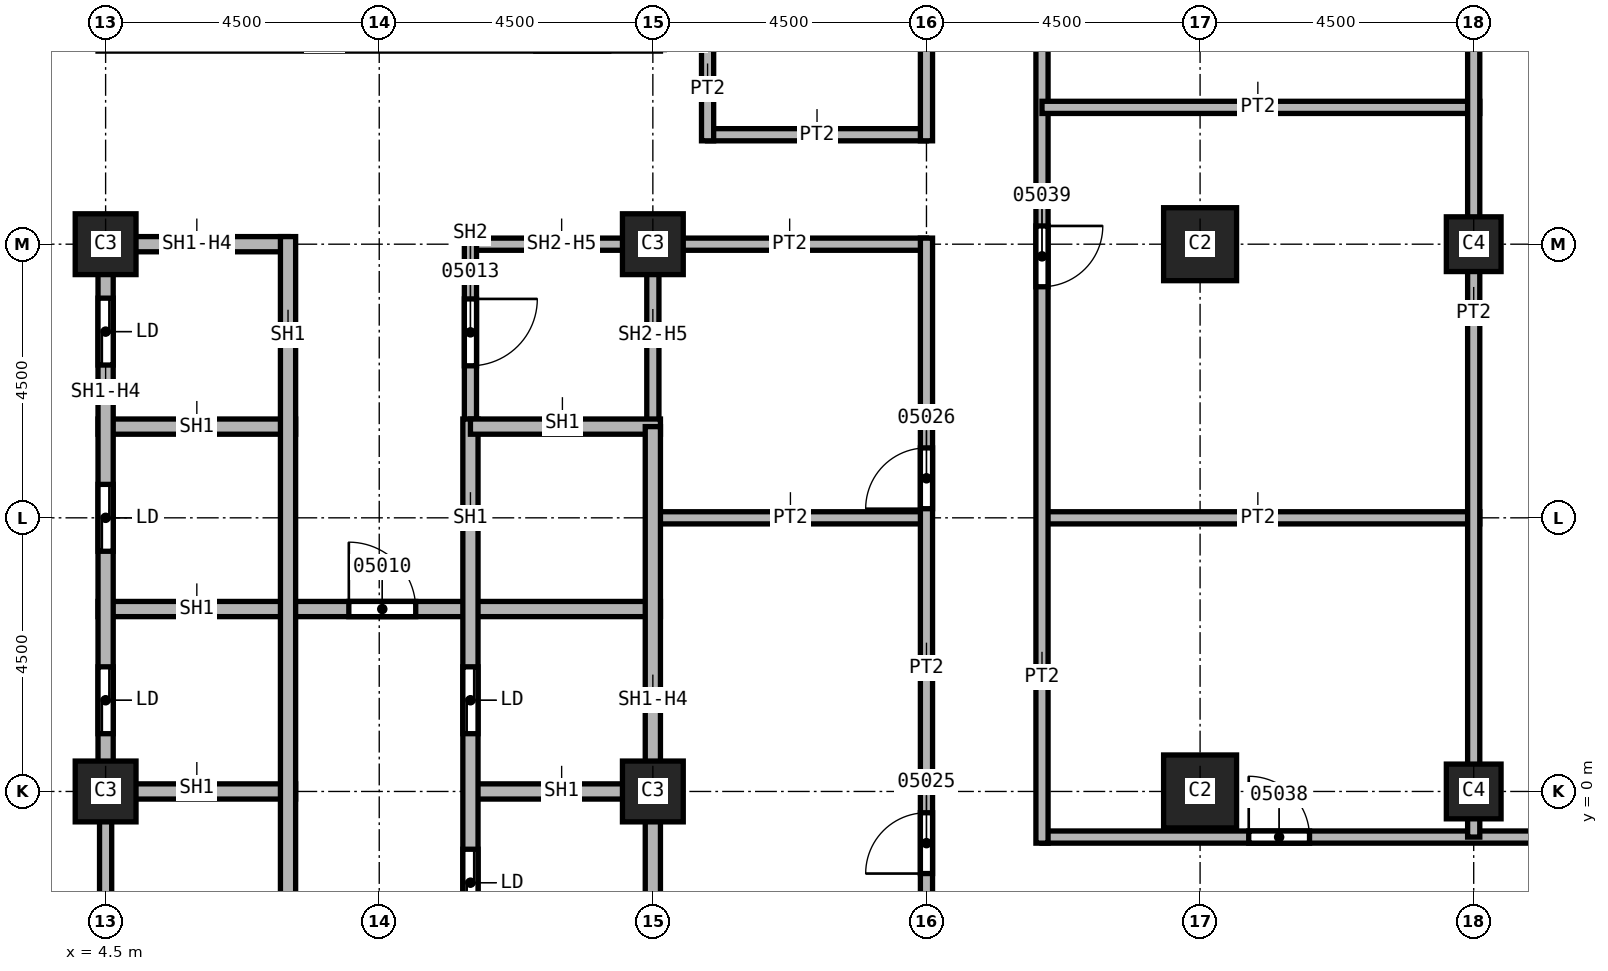
"""IFC4 building model, lengths in metres.
Left out: names, types, materials, properties, quantities, classifications, styles, units other than length and angle.
Written with IfcOpenShell. Run it as: python <this file> out.ifc"""

import sys

from ifc_helpers import new_model, si_unit, direction, frame, frame_2d, origin, origin_2d, place, context, subcontext, project, spatial, rectangle, extrude, element, fill, save


model = new_model("IFC4")
c1 = context("Model", 3, precision=1e-05, world=origin(), true_north=direction((0.0, 1.0)))
c2 = subcontext(c1, "Body", "Model", "MODEL_VIEW")
j1 = project(units=[si_unit("LENGTHUNIT", "METRE"), si_unit("PLANEANGLEUNIT", "RADIAN")], contexts=[c1])
p1 = place(None, origin())
s1 = spatial("IfcSite", under=j1, at=p1, CompositionType="ELEMENT")
p2 = place(p1, origin())
s2 = spatial("IfcBuilding", under=s1, at=p2, CompositionType="ELEMENT")
p3 = place(p2, frame((0.0, 0.0, 116.0)))
s3 = spatial("IfcBuildingStorey", under=s2, at=p3, CompositionType="ELEMENT", Elevation=116.0)
for number, where, z_axis, x_axis in (
    (1, (22.5, 0.0, 0.0), (0.0, 0.0, 1.0), (1.0, 0.0, 0.0)),
    (2, (22.5, 9.0, 0.0), (0.0, 0.0, 1.0), (1.0, 0.0, 0.0)),
):
    element("IfcColumn", number, at=place(p3, frame(where, z_axis=z_axis, x_axis=x_axis)), inside=s3, PredefinedType="COLUMN", context=c2, shape_type="SweptSolid", body=[
        extrude(rectangle(XDim=1.2, YDim=1.2, at=origin_2d()), origin(), (0.0, 0.0, 1.0), 3.6),
    ])
for number, where, z_axis, x_axis in (
    (3, (4.5, 0.0, 0.0), (0.0, 0.0, 1.0), (1.0, 0.0, 0.0)),
    (4, (4.5, 9.0, 0.0), (0.0, 0.0, 1.0), (1.0, 0.0, 0.0)),
    (5, (13.5, 0.0, 0.0), (0.0, 0.0, 1.0), (1.0, 0.0, 0.0)),
    (6, (13.5, 9.0, 0.0), (0.0, 0.0, 1.0), (1.0, 0.0, 0.0)),
):
    element("IfcColumn", number, at=place(p3, frame(where, z_axis=z_axis, x_axis=x_axis)), inside=s3, PredefinedType="COLUMN", context=c2, shape_type="SweptSolid", body=[
        extrude(rectangle(XDim=1.0, YDim=1.0, at=origin_2d()), origin(), (0.0, 0.0, 1.0), 3.6),
    ])
for number, where, z_axis, x_axis in (
    (7, (27.0, 0.0, 0.0), (0.0, 0.0, 1.0), (1.0, 0.0, 0.0)),
    (8, (27.0, 9.0, 0.0), (0.0, 0.0, 1.0), (1.0, 0.0, 0.0)),
):
    element("IfcColumn", number, at=place(p3, frame(where, z_axis=z_axis, x_axis=x_axis)), inside=s3, PredefinedType="COLUMN", context=c2, shape_type="SweptSolid", body=[
        extrude(rectangle(XDim=0.9, YDim=0.9, at=origin_2d()), origin(), (0.0, 0.0, 1.0), 3.6),
    ])
for number, where, z_axis, x_axis in (
    (9, (13.5, 4.5, 0.0), (0.0, 0.0, 1.0), (1.0, 0.0, 0.0)),
    (10, (18.0, 9.0, 0.0), (0.0, 0.0, 1.0), (-1.0, 0.0, 0.0)),
):
    element("IfcWall", number, at=place(p3, frame(where, z_axis=z_axis, x_axis=x_axis)), inside=s3, PredefinedType="PARTITIONING", context=c2, shape_type="SweptSolid", body=[
        extrude(rectangle(XDim=4.5, YDim=0.2, at=frame_2d((2.25, 0.0))), origin(), (0.0, 0.0, 1.0), 3.6),
    ])
p4 = place(p3, frame((14.4, 10.8, 0.0), z_axis=(0.0, 0.0, 1.0), x_axis=(1.0, 0.0, 0.0)))
e11 = element("IfcWall", 11, at=p4, inside=s3, PredefinedType="PARTITIONING", context=c2, shape_type="SweptSolid", body=[
    extrude(rectangle(XDim=3.6, YDim=0.2, at=frame_2d((1.8, 0.0))), origin(), (0.0, 0.0, 1.0), 3.6),
])
p5 = place(p3, frame((14.4, 12.3, 0.0), z_axis=(0.0, 0.0, 1.0), x_axis=(0.0, -1.0, 0.0)))
e12 = element("IfcWall", 12, at=p5, inside=s3, PredefinedType="PARTITIONING", context=c2, shape_type="SweptSolid", body=[
    extrude(rectangle(XDim=1.6, YDim=0.2, at=frame_2d((0.8, 0.0))), origin(), (0.0, 0.0, 1.0), 3.6),
])
p6 = place(p3, frame((18.0, -9.1, 0.0), z_axis=(0.0, 0.0, 1.0), x_axis=(0.0, 1.0, 0.0)))
e13 = element("IfcWall", 13, at=p6, inside=s3, PredefinedType="PARTITIONING", context=c2, shape_type="SweptSolid", body=[
    extrude(rectangle(XDim=18.2, YDim=0.2, at=frame_2d((9.1, 0.0))), origin(), (0.0, 0.0, 1.0), 3.6),
])
p7 = place(p6, frame((1.9, 0.0, 0.0)))
e14 = element("IfcOpeningElement", 14, at=p7, cuts=e13, PredefinedType="OPENING", context=c2, shape_type="SweptSolid", body=[
    extrude(rectangle(XDim=1.0, YDim=2.1, at=frame_2d((0.5, 1.05))), frame((0.0, 0.1, 0.0), z_axis=(0.0, -1.0, 0.0), x_axis=(1.0, 0.0, 0.0)), (0.0, 0.0, 1.0), 0.2),
])
p8 = place(p6, frame((7.75, 0.0, 0.0)))
e15 = element("IfcOpeningElement", 15, at=p8, cuts=e13, PredefinedType="OPENING", context=c2, shape_type="SweptSolid", body=[
    extrude(rectangle(XDim=1.0, YDim=2.1, at=frame_2d((0.5, 1.05))), frame((0.0, 0.1, 0.0), z_axis=(0.0, -1.0, 0.0), x_axis=(1.0, 0.0, 0.0)), (0.0, 0.0, 1.0), 0.2),
])
p9 = place(p6, frame((13.75, 0.0, 0.0)))
e16 = element("IfcOpeningElement", 16, at=p9, cuts=e13, PredefinedType="OPENING", context=c2, shape_type="SweptSolid", body=[
    extrude(rectangle(XDim=1.0, YDim=2.1, at=frame_2d((0.5, 1.05))), frame((0.0, 0.1, 0.0), z_axis=(0.0, -1.0, 0.0), x_axis=(1.0, 0.0, 0.0)), (0.0, 0.0, 1.0), 0.2),
])
p10 = place(p3, frame((18.0, 10.7, 0.0), z_axis=(0.0, 0.0, 1.0), x_axis=(0.0, 1.0, 0.0)))
e17 = element("IfcWall", 17, at=p10, inside=s3, PredefinedType="PARTITIONING", context=c2, shape_type="SweptSolid", body=[
    extrude(rectangle(XDim=13.5, YDim=0.2, at=frame_2d((6.75, 0.0))), origin(), (0.0, 0.0, 1.0), 3.6),
])
p11 = place(p10, frame((9.8, 0.0, 0.0)))
e18 = element("IfcOpeningElement", 18, at=p11, cuts=e17, PredefinedType="OPENING", context=c2, shape_type="SweptSolid", body=[
    extrude(rectangle(XDim=1.0, YDim=2.1, at=frame_2d((0.5, 1.05))), frame((0.0, 0.1, 0.0), z_axis=(0.0, -1.0, 0.0), x_axis=(1.0, 0.0, 0.0)), (0.0, 0.0, 1.0), 0.2),
])
p12 = place(p3, frame((19.9, -0.75, 0.0), z_axis=(0.0, 0.0, 1.0), x_axis=(1.0, 0.0, 0.0)))
e19 = element("IfcWall", 19, at=p12, inside=s3, PredefinedType="PARTITIONING", context=c2, shape_type="SweptSolid", body=[
    extrude(rectangle(XDim=13.95, YDim=0.2, at=frame_2d((6.975, 0.0))), origin(), (0.0, 0.0, 1.0), 3.6),
])
p13 = place(p12, frame((3.4, 0.0, 0.0)))
e20 = element("IfcOpeningElement", 20, at=p13, cuts=e19, PredefinedType="OPENING", context=c2, shape_type="SweptSolid", body=[
    extrude(rectangle(XDim=1.0, YDim=2.1, at=frame_2d((0.5, 1.05))), frame((0.0, 0.1, 0.0), z_axis=(0.0, -1.0, 0.0), x_axis=(1.0, 0.0, 0.0)), (0.0, 0.0, 1.0), 0.2),
])
p14 = place(p3, frame((19.9, 4.5, 0.0), z_axis=(0.0, 0.0, 1.0), x_axis=(1.0, 0.0, 0.0)))
e21 = element("IfcWall", 21, at=p14, inside=s3, PredefinedType="PARTITIONING", context=c2, shape_type="SweptSolid", body=[
    extrude(rectangle(XDim=7.2, YDim=0.2, at=frame_2d((3.6, 0.0))), origin(), (0.0, 0.0, 1.0), 3.6),
])
p15 = place(p3, frame((19.9, 24.5, 0.0), z_axis=(0.0, 0.0, 1.0), x_axis=(0.0, -1.0, 0.0)))
e22 = element("IfcWall", 22, at=p15, inside=s3, PredefinedType="PARTITIONING", context=c2, shape_type="SweptSolid", body=[
    extrude(rectangle(XDim=25.35, YDim=0.2, at=frame_2d((12.675, 0.0))), origin(), (0.0, 0.0, 1.0), 3.6),
])
p16 = place(p15, frame((15.2, 0.0, 0.0)))
e23 = element("IfcOpeningElement", 23, at=p16, cuts=e22, PredefinedType="OPENING", context=c2, shape_type="SweptSolid", body=[
    extrude(rectangle(XDim=1.0, YDim=2.1, at=frame_2d((0.5, 1.05))), frame((0.0, 0.1, 0.0), z_axis=(0.0, -1.0, 0.0), x_axis=(1.0, 0.0, 0.0)), (0.0, 0.0, 1.0), 0.2),
])
p17 = place(p15, frame((7.55, 0.0, 0.0)))
e24 = element("IfcOpeningElement", 24, at=p17, cuts=e22, PredefinedType="OPENING", context=c2, shape_type="SweptSolid", body=[
    extrude(rectangle(XDim=1.0, YDim=2.1, at=frame_2d((0.5, 1.05))), frame((0.0, 0.1, 0.0), z_axis=(0.0, -1.0, 0.0), x_axis=(1.0, 0.0, 0.0)), (0.0, 0.0, 1.0), 0.2),
])
p18 = place(p15, frame((0.55, 0.0, 0.0)))
e25 = element("IfcOpeningElement", 25, at=p18, cuts=e22, PredefinedType="OPENING", context=c2, shape_type="SweptSolid", body=[
    extrude(rectangle(XDim=1.0, YDim=2.1, at=frame_2d((0.5, 1.05))), frame((0.0, 0.1, 0.0), z_axis=(0.0, -1.0, 0.0), x_axis=(1.0, 0.0, 0.0)), (0.0, 0.0, 1.0), 0.2),
])
p19 = place(p3, frame((19.9, 11.25, 0.0), z_axis=(0.0, 0.0, 1.0), x_axis=(1.0, 0.0, 0.0)))
e26 = element("IfcWall", 26, at=p19, inside=s3, PredefinedType="PARTITIONING", context=c2, shape_type="SweptSolid", body=[
    extrude(rectangle(XDim=7.2, YDim=0.2, at=frame_2d((3.6, 0.0))), origin(), (0.0, 0.0, 1.0), 3.6),
])
p20 = place(p3, frame((27.0, 17.4, 0.0), z_axis=(0.0, 0.0, 1.0), x_axis=(0.0, -1.0, 0.0)))
e27 = element("IfcWall", 27, at=p20, inside=s3, PredefinedType="PARTITIONING", context=c2, shape_type="SweptSolid", body=[
    extrude(rectangle(XDim=18.15, YDim=0.2, at=frame_2d((9.075, 0.0))), origin(), (0.0, 0.0, 1.0), 3.6),
])
p21 = place(p3, frame((4.5, -9.1, 0.0), z_axis=(0.0, 0.0, 1.0), x_axis=(0.0, 1.0, 0.0)))
e28 = element("IfcWall", 28, at=p21, inside=s3, PredefinedType="SOLIDWALL", context=c2, shape_type="SweptSolid", body=[
    extrude(rectangle(XDim=9.1, YDim=0.2, at=frame_2d((4.55, 0.0))), origin(), (0.0, 0.0, 1.0), 2.838),
])
p22 = place(p21, frame((2.2, 0.0, 0.0)))
e29 = element("IfcOpeningElement", 29, at=p22, cuts=e28, PredefinedType="OPENING", context=c2, shape_type="SweptSolid", body=[
    extrude(rectangle(XDim=1.1, YDim=2.1, at=frame_2d((0.55, 1.05))), frame((0.0, 0.1, 0.0), z_axis=(0.0, -1.0, 0.0), x_axis=(1.0, 0.0, 0.0)), (0.0, 0.0, 1.0), 0.2),
])
p23 = place(p3, frame((10.5, 9.0, 0.0), z_axis=(0.0, 0.0, 1.0), x_axis=(1.0, 0.0, 0.0)))
e30 = element("IfcWall", 30, at=p23, inside=s3, PredefinedType="SOLIDWALL", context=c2, shape_type="SweptSolid", body=[
    extrude(rectangle(XDim=3.1, YDim=0.2, at=frame_2d((1.55, 0.0))), origin(), (0.0, 0.0, 1.0), 2.838),
])
p24 = place(p3, frame((10.5, 9.1, 0.0), z_axis=(0.0, 0.0, 1.0), x_axis=(0.0, -1.0, 0.0)))
e31 = element("IfcWall", 31, at=p24, inside=s3, PredefinedType="SOLIDWALL", context=c2, shape_type="SweptSolid", body=[
    extrude(rectangle(XDim=3.225, YDim=0.2, at=frame_2d((1.613, 0.0))), origin(), (0.0, 0.0, 1.0), 3.6),
])
p25 = place(p24, frame((1.0, 0.0, 0.0)))
e32 = element("IfcOpeningElement", 32, at=p25, cuts=e31, PredefinedType="OPENING", context=c2, shape_type="SweptSolid", body=[
    extrude(rectangle(XDim=1.1, YDim=2.1, at=frame_2d((0.55, 1.05))), frame((0.0, 0.1, 0.0), z_axis=(0.0, -1.0, 0.0), x_axis=(1.0, 0.0, 0.0)), (0.0, 0.0, 1.0), 0.2),
])
p26 = place(p3, frame((13.5, 9.1, 0.0), z_axis=(0.0, 0.0, 1.0), x_axis=(0.0, -1.0, 0.0)))
e33 = element("IfcWall", 33, at=p26, inside=s3, PredefinedType="SOLIDWALL", context=c2, shape_type="SweptSolid", body=[
    extrude(rectangle(XDim=3.1, YDim=0.2, at=frame_2d((1.55, 0.0))), origin(), (0.0, 0.0, 1.0), 2.838),
])
p27 = place(p3, frame((4.375, 0.0, 0.0), z_axis=(0.0, 0.0, 1.0), x_axis=(1.0, 0.0, 0.0)))
e34 = element("IfcWall", 34, at=p27, inside=s3, PredefinedType="SOLIDWALL", context=c2, shape_type="SweptSolid", body=[
    extrude(rectangle(XDim=3.25, YDim=0.25, at=frame_2d((1.625, 0.0))), origin(), (0.0, 0.0, 1.0), 3.6),
])
p28 = place(p3, frame((4.375, 3.0, 0.0), z_axis=(0.0, 0.0, 1.0), x_axis=(1.0, 0.0, 0.0)))
e35 = element("IfcWall", 35, at=p28, inside=s3, PredefinedType="SOLIDWALL", context=c2, shape_type="SweptSolid", body=[
    extrude(rectangle(XDim=9.25, YDim=0.25, at=frame_2d((4.625, 0.0))), origin(), (0.0, 0.0, 1.0), 3.6),
])
p29 = place(p28, frame((4.125, 0.0, 0.0)))
e36 = element("IfcOpeningElement", 36, at=p29, cuts=e35, PredefinedType="OPENING", context=c2, shape_type="SweptSolid", body=[
    extrude(rectangle(XDim=1.1, YDim=2.1, at=frame_2d((0.55, 1.05))), frame((0.0, 0.125, 0.0), z_axis=(0.0, -1.0, 0.0), x_axis=(1.0, 0.0, 0.0)), (0.0, 0.0, 1.0), 0.25),
])
p30 = place(p3, frame((4.375, 6.0, 0.0), z_axis=(0.0, 0.0, 1.0), x_axis=(1.0, 0.0, 0.0)))
e37 = element("IfcWall", 37, at=p30, inside=s3, PredefinedType="SOLIDWALL", context=c2, shape_type="SweptSolid", body=[
    extrude(rectangle(XDim=3.25, YDim=0.25, at=frame_2d((1.625, 0.0))), origin(), (0.0, 0.0, 1.0), 3.6),
])
p31 = place(p3, frame((4.5, 0.0, 0.0), z_axis=(0.0, 0.0, 1.0), x_axis=(0.0, 1.0, 0.0)))
e38 = element("IfcWall", 38, at=p31, inside=s3, PredefinedType="SOLIDWALL", context=c2, shape_type="SweptSolid", body=[
    extrude(rectangle(XDim=9.125, YDim=0.25, at=frame_2d((4.562, 0.0))), origin(), (0.0, 0.0, 1.0), 2.838),
])
p32 = place(p31, frame((0.95, 0.0, 0.0)))
e39 = element("IfcOpeningElement", 39, at=p32, cuts=e38, PredefinedType="OPENING", context=c2, shape_type="SweptSolid", body=[
    extrude(rectangle(XDim=1.1, YDim=2.1, at=frame_2d((0.55, 1.05))), frame((0.0, 0.125, 0.0), z_axis=(0.0, -1.0, 0.0), x_axis=(1.0, 0.0, 0.0)), (0.0, 0.0, 1.0), 0.25),
])
p33 = place(p31, frame((3.95, 0.0, 0.0)))
e40 = element("IfcOpeningElement", 40, at=p33, cuts=e38, PredefinedType="OPENING", context=c2, shape_type="SweptSolid", body=[
    extrude(rectangle(XDim=1.1, YDim=2.1, at=frame_2d((0.55, 1.05))), frame((0.0, 0.125, 0.0), z_axis=(0.0, -1.0, 0.0), x_axis=(1.0, 0.0, 0.0)), (0.0, 0.0, 1.0), 0.25),
])
p34 = place(p31, frame((7.012, 0.0, 0.0)))
e41 = element("IfcOpeningElement", 41, at=p34, cuts=e38, PredefinedType="OPENING", context=c2, shape_type="SweptSolid", body=[
    extrude(rectangle(XDim=1.1, YDim=2.1, at=frame_2d((0.55, 1.05))), frame((0.0, 0.125, 0.0), z_axis=(0.0, -1.0, 0.0), x_axis=(1.0, 0.0, 0.0)), (0.0, 0.0, 1.0), 0.25),
])
p35 = place(p3, frame((4.5, 9.0, 0.0), z_axis=(0.0, 0.0, 1.0), x_axis=(1.0, 0.0, 0.0)))
e42 = element("IfcWall", 42, at=p35, inside=s3, PredefinedType="SOLIDWALL", context=c2, shape_type="SweptSolid", body=[
    extrude(rectangle(XDim=3.0, YDim=0.25, at=frame_2d((1.5, 0.0))), origin(), (0.0, 0.0, 1.0), 2.838),
])
p36 = place(p3, frame((7.5, 9.125, 0.0), z_axis=(0.0, 0.0, 1.0), x_axis=(0.0, -1.0, 0.0)))
e43 = element("IfcWall", 43, at=p36, inside=s3, PredefinedType="SOLIDWALL", context=c2, shape_type="SweptSolid", body=[
    extrude(rectangle(XDim=12.25, YDim=0.25, at=frame_2d((6.125, 0.0))), origin(), (0.0, 0.0, 1.0), 3.6),
])
p37 = place(p3, frame((10.5, 0.0, 0.0), z_axis=(0.0, 0.0, 1.0), x_axis=(1.0, 0.0, 0.0)))
e44 = element("IfcWall", 44, at=p37, inside=s3, PredefinedType="SOLIDWALL", context=c2, shape_type="SweptSolid", body=[
    extrude(rectangle(XDim=3.125, YDim=0.25, at=frame_2d((1.562, 0.0))), origin(), (0.0, 0.0, 1.0), 3.6),
])
p38 = place(p3, frame((10.5, 6.125, 0.0), z_axis=(0.0, 0.0, 1.0), x_axis=(0.0, -1.0, 0.0)))
e45 = element("IfcWall", 45, at=p38, inside=s3, PredefinedType="SOLIDWALL", context=c2, shape_type="SweptSolid", body=[
    extrude(rectangle(XDim=9.25, YDim=0.25, at=frame_2d((4.625, 0.0))), origin(), (0.0, 0.0, 1.0), 3.6),
])
p39 = place(p38, frame((7.075, 0.0, 0.0)))
e46 = element("IfcOpeningElement", 46, at=p39, cuts=e45, PredefinedType="OPENING", context=c2, shape_type="SweptSolid", body=[
    extrude(rectangle(XDim=1.1, YDim=2.1, at=frame_2d((0.55, 1.05))), frame((0.0, 0.125, 0.0), z_axis=(0.0, -1.0, 0.0), x_axis=(1.0, 0.0, 0.0)), (0.0, 0.0, 1.0), 0.25),
])
p40 = place(p38, frame((4.075, 0.0, 0.0)))
e47 = element("IfcOpeningElement", 47, at=p40, cuts=e45, PredefinedType="OPENING", context=c2, shape_type="SweptSolid", body=[
    extrude(rectangle(XDim=1.1, YDim=2.1, at=frame_2d((0.55, 1.05))), frame((0.0, 0.125, 0.0), z_axis=(0.0, -1.0, 0.0), x_axis=(1.0, 0.0, 0.0)), (0.0, 0.0, 1.0), 0.25),
])
p41 = place(p3, frame((10.5, 6.0, 0.0), z_axis=(0.0, 0.0, 1.0), x_axis=(1.0, 0.0, 0.0)))
e48 = element("IfcWall", 48, at=p41, inside=s3, PredefinedType="SOLIDWALL", context=c2, shape_type="SweptSolid", body=[
    extrude(rectangle(XDim=3.125, YDim=0.25, at=frame_2d((1.562, 0.0))), origin(), (0.0, 0.0, 1.0), 3.6),
])
p42 = place(p3, frame((13.5, 6.0, 0.0), z_axis=(0.0, 0.0, 1.0), x_axis=(0.0, -1.0, 0.0)))
e49 = element("IfcWall", 49, at=p42, inside=s3, PredefinedType="SOLIDWALL", context=c2, shape_type="SweptSolid", body=[
    extrude(rectangle(XDim=9.0, YDim=0.25, at=frame_2d((4.5, 0.0))), origin(), (0.0, 0.0, 1.0), 2.838),
])
p43 = place(p29, origin())
e50 = element("IfcDoor", 50, at=p43, inside=s3, OperationType="SINGLE_SWING_LEFT", PredefinedType="DOOR", context=c2, shape_type="SweptSolid", body=[
    extrude(rectangle(XDim=1.1, YDim=2.1, at=frame_2d((0.55, 1.05))), frame((0.0, 0.025, 0.0), z_axis=(0.0, -1.0, 0.0), x_axis=(1.0, 0.0, 0.0)), (0.0, 0.0, 1.0), 0.05),
])
fill(e36, e50)
p44 = place(p25, origin())
e51 = element("IfcDoor", 51, at=p44, inside=s3, OperationType="SINGLE_SWING_RIGHT", PredefinedType="DOOR", context=c2, shape_type="SweptSolid", body=[
    extrude(rectangle(XDim=1.1, YDim=2.1, at=frame_2d((0.55, 1.05))), frame((0.0, 0.025, 0.0), z_axis=(0.0, -1.0, 0.0), x_axis=(1.0, 0.0, 0.0)), (0.0, 0.0, 1.0), 0.05),
])
fill(e32, e51)
p45 = place(p8, origin())
e52 = element("IfcDoor", 52, at=p45, inside=s3, OperationType="SINGLE_SWING_RIGHT", PredefinedType="DOOR", context=c2, shape_type="SweptSolid", body=[
    extrude(rectangle(XDim=1.0, YDim=2.1, at=frame_2d((0.5, 1.05))), frame((0.0, 0.025, 0.0), z_axis=(0.0, -1.0, 0.0), x_axis=(1.0, 0.0, 0.0)), (0.0, 0.0, 1.0), 0.05),
])
fill(e15, e52)
p46 = place(p9, origin())
e53 = element("IfcDoor", 53, at=p46, inside=s3, OperationType="SINGLE_SWING_LEFT", PredefinedType="DOOR", context=c2, shape_type="SweptSolid", body=[
    extrude(rectangle(XDim=1.0, YDim=2.1, at=frame_2d((0.5, 1.05))), frame((0.0, 0.025, 0.0), z_axis=(0.0, -1.0, 0.0), x_axis=(1.0, 0.0, 0.0)), (0.0, 0.0, 1.0), 0.05),
])
fill(e16, e53)
p47 = place(p13, origin())
e54 = element("IfcDoor", 54, at=p47, inside=s3, OperationType="SINGLE_SWING_LEFT", PredefinedType="DOOR", context=c2, shape_type="SweptSolid", body=[
    extrude(rectangle(XDim=1.0, YDim=2.1, at=frame_2d((0.5, 1.05))), frame((0.0, 0.025, 0.0), z_axis=(0.0, -1.0, 0.0), x_axis=(1.0, 0.0, 0.0)), (0.0, 0.0, 1.0), 0.05),
])
fill(e20, e54)
p48 = place(p16, origin())
e55 = element("IfcDoor", 55, at=p48, inside=s3, OperationType="SINGLE_SWING_RIGHT", PredefinedType="DOOR", context=c2, shape_type="SweptSolid", body=[
    extrude(rectangle(XDim=1.0, YDim=2.1, at=frame_2d((0.5, 1.05))), frame((0.0, 0.025, 0.0), z_axis=(0.0, -1.0, 0.0), x_axis=(1.0, 0.0, 0.0)), (0.0, 0.0, 1.0), 0.05),
])
fill(e23, e55)
p49 = place(p32, origin())
e56 = element("IfcDoor", 56, at=p49, inside=s3, OperationType="SLIDING_TO_LEFT", PredefinedType="DOOR", context=c2, shape_type="SweptSolid", body=[
    extrude(rectangle(XDim=1.1, YDim=2.1, at=frame_2d((0.55, 1.05))), frame((0.0, 0.025, 0.0), z_axis=(0.0, -1.0, 0.0), x_axis=(1.0, 0.0, 0.0)), (0.0, 0.0, 1.0), 0.05),
])
fill(e39, e56)
p50 = place(p33, origin())
e57 = element("IfcDoor", 57, at=p50, inside=s3, OperationType="SLIDING_TO_LEFT", PredefinedType="DOOR", context=c2, shape_type="SweptSolid", body=[
    extrude(rectangle(XDim=1.1, YDim=2.1, at=frame_2d((0.55, 1.05))), frame((0.0, 0.025, 0.0), z_axis=(0.0, -1.0, 0.0), x_axis=(1.0, 0.0, 0.0)), (0.0, 0.0, 1.0), 0.05),
])
fill(e40, e57)
p51 = place(p34, origin())
e58 = element("IfcDoor", 58, at=p51, inside=s3, OperationType="SLIDING_TO_LEFT", PredefinedType="DOOR", context=c2, shape_type="SweptSolid", body=[
    extrude(rectangle(XDim=1.1, YDim=2.1, at=frame_2d((0.55, 1.05))), frame((0.0, 0.025, 0.0), z_axis=(0.0, -1.0, 0.0), x_axis=(1.0, 0.0, 0.0)), (0.0, 0.0, 1.0), 0.05),
])
fill(e41, e58)
p52 = place(p39, origin())
e59 = element("IfcDoor", 59, at=p52, inside=s3, OperationType="SLIDING_TO_LEFT", PredefinedType="DOOR", context=c2, shape_type="SweptSolid", body=[
    extrude(rectangle(XDim=1.1, YDim=2.1, at=frame_2d((0.55, 1.05))), frame((0.0, 0.025, 0.0), z_axis=(0.0, -1.0, 0.0), x_axis=(1.0, 0.0, 0.0)), (0.0, 0.0, 1.0), 0.05),
])
fill(e46, e59)
p53 = place(p40, origin())
e60 = element("IfcDoor", 60, at=p53, inside=s3, OperationType="SLIDING_TO_LEFT", PredefinedType="DOOR", context=c2, shape_type="SweptSolid", body=[
    extrude(rectangle(XDim=1.1, YDim=2.1, at=frame_2d((0.55, 1.05))), frame((0.0, 0.025, 0.0), z_axis=(0.0, -1.0, 0.0), x_axis=(1.0, 0.0, 0.0)), (0.0, 0.0, 1.0), 0.05),
])
fill(e47, e60)
save(model, sys.argv[1])
